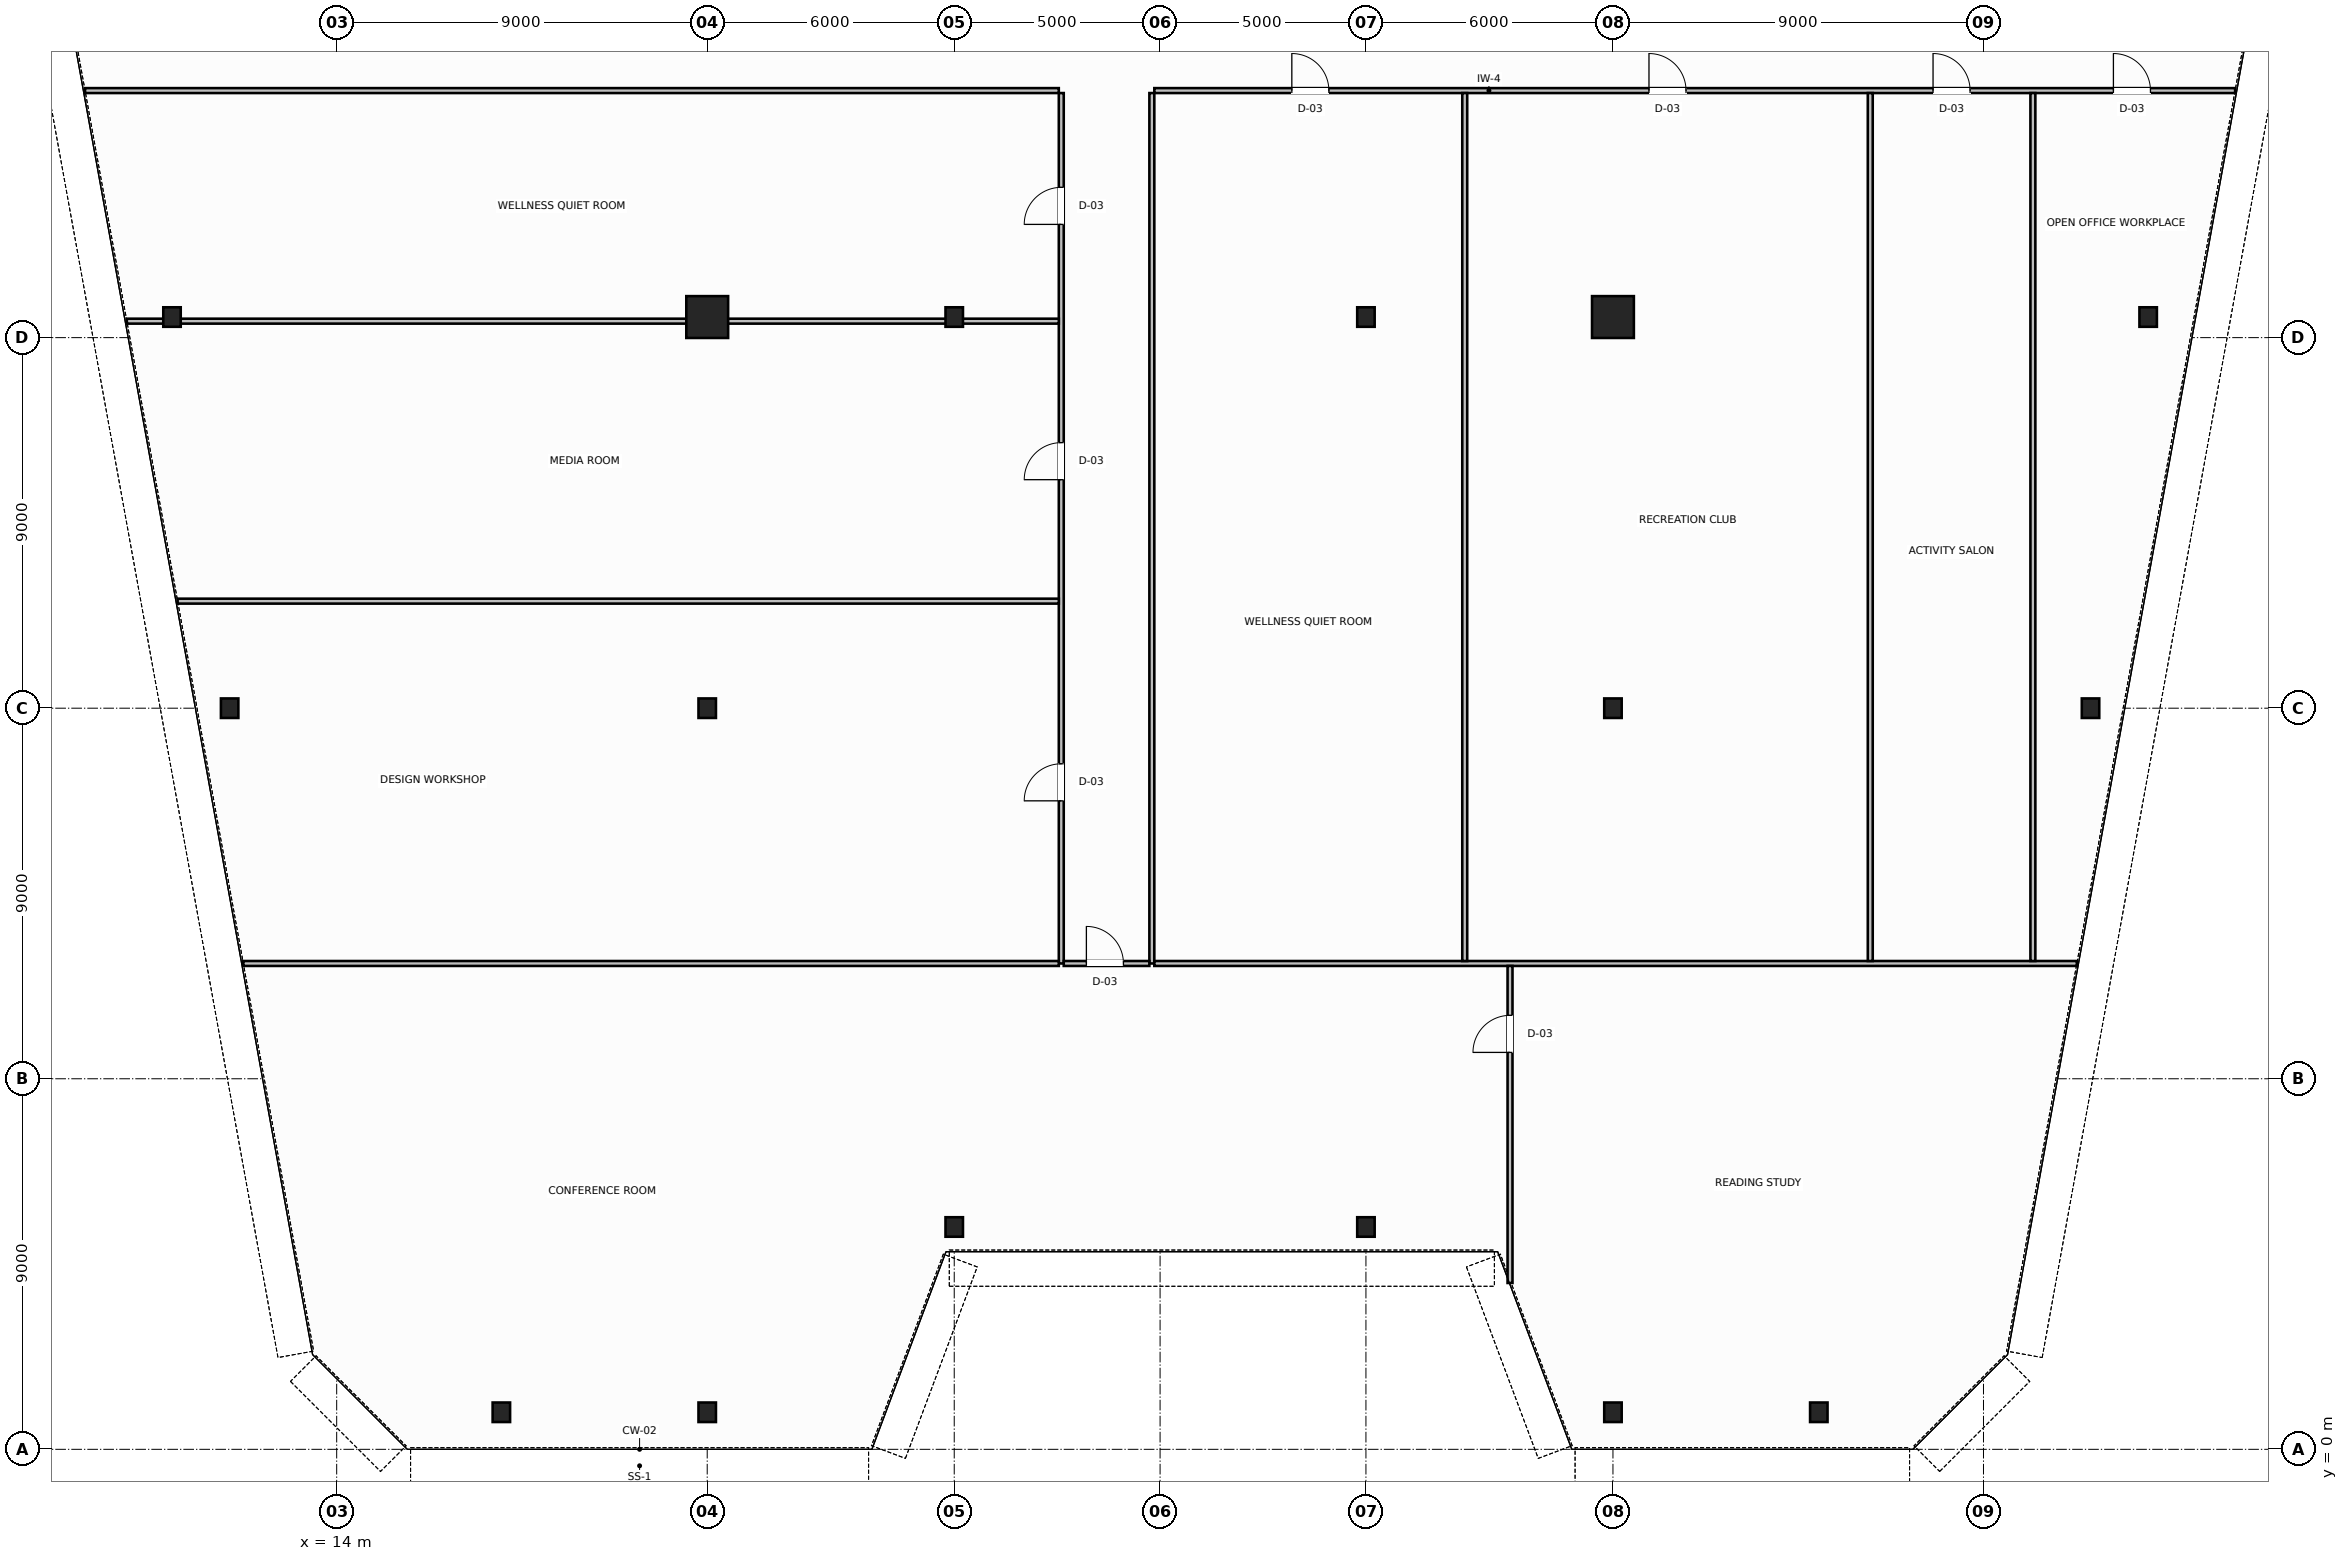
"""IFC4 building model, lengths in metres.
Left out: names, types, materials, properties, quantities, classifications, styles, units other than length and angle.
Written with IfcOpenShell. Run it as: python <this file> out.ifc"""

import sys

from ifc_helpers import new_model, si_unit, direction, frame, frame_2d, origin, origin_2d, place, context, subcontext, project, spatial, rectangle, hollow_circle, i_section, extrude, source, transform, mapped, element, fill, save


model = new_model("IFC4")
c1 = context("Model", 3, precision=1e-05, world=origin(), true_north=direction((0.0, 1.0)))
c2 = subcontext(c1, "Body", "Model", "MODEL_VIEW")
j1 = project(units=[si_unit("LENGTHUNIT", "METRE"), si_unit("PLANEANGLEUNIT", "RADIAN")], contexts=[c1])
p1 = place(None, origin())
s1 = spatial("IfcSite", under=j1, at=p1, CompositionType="ELEMENT")
p2 = place(p1, origin())
s2 = spatial("IfcBuilding", under=s1, at=p2, CompositionType="ELEMENT")
p3 = place(p2, frame((0.0, 0.0, 145.2)))
s3 = spatial("IfcBuildingStorey", under=s2, at=p3, CompositionType="ELEMENT", Elevation=145.2)
m1 = source(origin(), c2, "Body", "SweptSolid", [
    extrude(i_section(OverallWidth=0.424, OverallDepth=0.474, WebThickness=0.047, FlangeThickness=0.065, FilletRadius=0.015, at=origin_2d()), origin(), (0.0, 0.0, 1.0), 3.8),
])
for number, where, z_axis, x_axis in (
    (1, (10.0, 27.5, 0.0), (0.0, 0.0, 1.0), (1.0, 0.0, 0.0)),
    (2, (11.4, 18.0, 0.0), (0.0, 0.0, 1.0), (1.0, 0.0, 0.0)),
    (3, (58.0, 27.5, 0.0), (0.0, 0.0, 1.0), (1.0, 0.0, 0.0)),
    (4, (56.6, 18.0, 0.0), (0.0, 0.0, 1.0), (1.0, 0.0, 0.0)),
):
    element("IfcColumn", number, at=place(p3, frame(where, z_axis=z_axis, x_axis=x_axis)), inside=s3, PredefinedType="COLUMN", context=c2, shape_type="MappedRepresentation", body=[
        mapped(m1, transform((0.0, 0.0, 0.0), scale=1.0)),
    ])
m2 = source(origin(), c2, "Body", "SweptSolid", [
    extrude(hollow_circle(Radius=0.508, WallThickness=0.045, at=origin_2d()), origin(), (0.0, 0.0, 1.0), 3.8),
])
p4 = place(p3, frame((23.0, 27.5, 0.0), z_axis=(0.0, 0.0, 1.0), x_axis=(1.0, 0.0, 0.0)))
e5 = element("IfcColumn", 5, at=p4, inside=s3, PredefinedType="COLUMN", context=c2, shape_type="MappedRepresentation", body=[
    mapped(m2, transform((0.0, 0.0, 0.0), scale=1.0)),
])
m3 = source(origin(), c2, "Body", "SweptSolid", [
    extrude(i_section(OverallWidth=0.424, OverallDepth=0.474, WebThickness=0.047, FlangeThickness=0.065, FilletRadius=0.015, at=origin_2d()), origin(), (0.0, 0.0, 1.0), 3.8),
])
for number, where, z_axis, x_axis in (
    (6, (29.0, 27.5, 0.0), (0.0, 0.0, 1.0), (1.0, 0.0, 0.0)),
    (7, (39.0, 27.5, 0.0), (0.0, 0.0, 1.0), (1.0, 0.0, 0.0)),
):
    element("IfcColumn", number, at=place(p3, frame(where, z_axis=z_axis, x_axis=x_axis)), inside=s3, PredefinedType="COLUMN", context=c2, shape_type="MappedRepresentation", body=[
        mapped(m3, transform((0.0, 0.0, 0.0), scale=1.0)),
    ])
p5 = place(p3, frame((45.0, 27.5, 0.0), z_axis=(0.0, 0.0, 1.0), x_axis=(1.0, 0.0, 0.0)))
e8 = element("IfcColumn", 8, at=p5, inside=s3, PredefinedType="COLUMN", context=c2, shape_type="MappedRepresentation", body=[
    mapped(m2, transform((0.0, 0.0, 0.0), scale=1.0)),
])
for number, where, z_axis, x_axis in (
    (9, (23.0, 18.0, 0.0), (0.0, 0.0, 1.0), (1.0, 0.0, 0.0)),
    (10, (45.0, 18.0, 0.0), (0.0, 0.0, 1.0), (1.0, 0.0, 0.0)),
    (11, (18.0, 0.9, 0.0), (0.0, 0.0, 1.0), (1.0, 0.0, 0.0)),
    (12, (23.0, 0.9, 0.0), (0.0, 0.0, 1.0), (1.0, 0.0, 0.0)),
    (13, (29.0, 5.4, 0.0), (0.0, 0.0, 1.0), (1.0, 0.0, 0.0)),
    (14, (39.0, 5.4, 0.0), (0.0, 0.0, 1.0), (1.0, 0.0, 0.0)),
    (15, (45.0, 0.9, 0.0), (0.0, 0.0, 1.0), (1.0, 0.0, 0.0)),
    (16, (50.0, 0.9, 0.0), (0.0, 0.0, 1.0), (1.0, 0.0, 0.0)),
):
    element("IfcColumn", number, at=place(p3, frame(where, z_axis=z_axis, x_axis=x_axis)), inside=s3, PredefinedType="COLUMN", context=c2, shape_type="MappedRepresentation", body=[
        mapped(m3, transform((0.0, 0.0, 0.0), scale=1.0)),
    ])
p6 = place(p3, frame((7.887, 33.0, 0.0), z_axis=(0.0, 0.0, 1.0), x_axis=(1.0, 0.0, 0.0)))
e17 = element("IfcWall", 17, at=p6, inside=s3, PredefinedType="PARTITIONING", context=c2, shape_type="SweptSolid", body=[
    extrude(rectangle(XDim=23.653, YDim=0.12, at=frame_2d((11.826, 0.0))), origin(), (0.0, 0.0, 1.0), 3.08),
])
p7 = place(p3, frame((33.86, 33.0, 0.0), z_axis=(0.0, 0.0, 1.0), x_axis=(1.0, 0.0, 0.0)))
e18 = element("IfcWall", 18, at=p7, inside=s3, PredefinedType="PARTITIONING", context=c2, shape_type="SweptSolid", body=[
    extrude(rectangle(XDim=26.253, YDim=0.12, at=frame_2d((13.126, 0.0))), origin(), (0.0, 0.0, 1.0), 3.08),
])
p8 = place(p7, frame((3.34, 0.0, 0.0)))
e19 = element("IfcOpeningElement", 19, at=p8, cuts=e18, PredefinedType="OPENING", context=c2, shape_type="SweptSolid", body=[
    extrude(rectangle(XDim=0.9, YDim=2.15, at=frame_2d((0.45, 1.075))), frame((0.0, 0.07, 0.0), z_axis=(0.0, -1.0, 0.0), x_axis=(1.0, 0.0, 0.0)), (0.0, 0.0, 1.0), 0.14),
])
p9 = place(p7, frame((12.015, 0.0, 0.0)))
e20 = element("IfcOpeningElement", 20, at=p9, cuts=e18, PredefinedType="OPENING", context=c2, shape_type="SweptSolid", body=[
    extrude(rectangle(XDim=0.9, YDim=2.15, at=frame_2d((0.45, 1.075))), frame((0.0, 0.07, 0.0), z_axis=(0.0, -1.0, 0.0), x_axis=(1.0, 0.0, 0.0)), (0.0, 0.0, 1.0), 0.14),
])
p10 = place(p7, frame((18.915, 0.0, 0.0)))
e21 = element("IfcOpeningElement", 21, at=p10, cuts=e18, PredefinedType="OPENING", context=c2, shape_type="SweptSolid", body=[
    extrude(rectangle(XDim=0.9, YDim=2.15, at=frame_2d((0.45, 1.075))), frame((0.0, 0.07, 0.0), z_axis=(0.0, -1.0, 0.0), x_axis=(1.0, 0.0, 0.0)), (0.0, 0.0, 1.0), 0.14),
])
p11 = place(p7, frame((23.296, 0.0, 0.0)))
e22 = element("IfcOpeningElement", 22, at=p11, cuts=e18, PredefinedType="OPENING", context=c2, shape_type="SweptSolid", body=[
    extrude(rectangle(XDim=0.9, YDim=2.15, at=frame_2d((0.45, 1.075))), frame((0.0, 0.07, 0.0), z_axis=(0.0, -1.0, 0.0), x_axis=(1.0, 0.0, 0.0)), (0.0, 0.0, 1.0), 0.14),
])
p12 = place(p3, frame((31.6, 11.8, 0.0), z_axis=(0.0, 0.0, 1.0), x_axis=(0.0, 1.0, 0.0)))
e23 = element("IfcWall", 23, at=p12, inside=s3, PredefinedType="PARTITIONING", context=c2, shape_type="SweptSolid", body=[
    extrude(rectangle(XDim=21.14, YDim=0.12, at=frame_2d((10.57, 0.0))), origin(), (0.0, 0.0, 1.0), 3.54),
])
p13 = place(p12, frame((3.95, 0.0, 0.0)))
e24 = element("IfcOpeningElement", 24, at=p13, cuts=e23, PredefinedType="OPENING", context=c2, shape_type="SweptSolid", body=[
    extrude(rectangle(XDim=0.9, YDim=2.15, at=frame_2d((0.45, 1.075))), frame((0.0, 0.07, 0.0), z_axis=(0.0, -1.0, 0.0), x_axis=(1.0, 0.0, 0.0)), (0.0, 0.0, 1.0), 0.14),
])
p14 = place(p12, frame((11.75, 0.0, 0.0)))
e25 = element("IfcOpeningElement", 25, at=p14, cuts=e23, PredefinedType="OPENING", context=c2, shape_type="SweptSolid", body=[
    extrude(rectangle(XDim=0.9, YDim=2.15, at=frame_2d((0.45, 1.075))), frame((0.0, 0.07, 0.0), z_axis=(0.0, -1.0, 0.0), x_axis=(1.0, 0.0, 0.0)), (0.0, 0.0, 1.0), 0.14),
])
p15 = place(p12, frame((17.95, 0.0, 0.0)))
e26 = element("IfcOpeningElement", 26, at=p15, cuts=e23, PredefinedType="OPENING", context=c2, shape_type="SweptSolid", body=[
    extrude(rectangle(XDim=0.9, YDim=2.15, at=frame_2d((0.45, 1.075))), frame((0.0, 0.07, 0.0), z_axis=(0.0, -1.0, 0.0), x_axis=(1.0, 0.0, 0.0)), (0.0, 0.0, 1.0), 0.14),
])
p16 = place(p3, frame((33.8, 11.8, 0.0), z_axis=(0.0, 0.0, 1.0), x_axis=(0.0, 1.0, 0.0)))
e27 = element("IfcWall", 27, at=p16, inside=s3, PredefinedType="PARTITIONING", context=c2, shape_type="SweptSolid", body=[
    extrude(rectangle(XDim=21.14, YDim=0.12, at=frame_2d((10.57, 0.0))), origin(), (0.0, 0.0, 1.0), 3.54),
])
p17 = place(p3, frame((31.66, 11.8, 0.0), z_axis=(0.0, 0.0, 1.0), x_axis=(1.0, 0.0, 0.0)))
e28 = element("IfcWall", 28, at=p17, inside=s3, PredefinedType="PARTITIONING", context=c2, shape_type="SweptSolid", body=[
    extrude(rectangle(XDim=2.08, YDim=0.12, at=frame_2d((1.04, 0.0))), origin(), (0.0, 0.0, 1.0), 3.54),
])
p18 = place(p17, frame((0.55, 0.0, 0.0)))
e29 = element("IfcOpeningElement", 29, at=p18, cuts=e28, PredefinedType="OPENING", context=c2, shape_type="SweptSolid", body=[
    extrude(rectangle(XDim=0.9, YDim=2.15, at=frame_2d((0.45, 1.075))), frame((0.0, 0.07, 0.0), z_axis=(0.0, -1.0, 0.0), x_axis=(1.0, 0.0, 0.0)), (0.0, 0.0, 1.0), 0.14),
])
p19 = place(p3, frame((11.732, 11.8, 0.0), z_axis=(0.0, 0.0, 1.0), x_axis=(1.0, 0.0, 0.0)))
e30 = element("IfcWall", 30, at=p19, inside=s3, PredefinedType="PARTITIONING", context=c2, shape_type="SweptSolid", body=[
    extrude(rectangle(XDim=19.808, YDim=0.12, at=frame_2d((9.904, 0.0))), origin(), (0.0, 0.0, 1.0), 3.54),
])
p20 = place(p3, frame((33.86, 11.8, 0.0), z_axis=(0.0, 0.0, 1.0), x_axis=(1.0, 0.0, 0.0)))
e31 = element("IfcWall", 31, at=p20, inside=s3, PredefinedType="PARTITIONING", context=c2, shape_type="SweptSolid", body=[
    extrude(rectangle(XDim=22.408, YDim=0.12, at=frame_2d((11.204, 0.0))), origin(), (0.0, 0.0, 1.0), 3.54),
])
p21 = place(p3, frame((42.5, 4.04, 0.0), z_axis=(0.0, 0.0, 1.0), x_axis=(0.0, 1.0, 0.0)))
e32 = element("IfcWall", 32, at=p21, inside=s3, PredefinedType="PARTITIONING", context=c2, shape_type="SweptSolid", body=[
    extrude(rectangle(XDim=7.7, YDim=0.12, at=frame_2d((3.85, 0.0))), origin(), (0.0, 0.0, 1.0), 3.54),
])
p22 = place(p21, frame((5.6, 0.0, 0.0)))
e33 = element("IfcOpeningElement", 33, at=p22, cuts=e32, PredefinedType="OPENING", context=c2, shape_type="SweptSolid", body=[
    extrude(rectangle(XDim=0.9, YDim=2.15, at=frame_2d((0.45, 1.075))), frame((0.0, 0.07, 0.0), z_axis=(0.0, -1.0, 0.0), x_axis=(1.0, 0.0, 0.0)), (0.0, 0.0, 1.0), 0.14),
])
p23 = place(p3, frame((10.136, 20.6, 0.0), z_axis=(0.0, 0.0, 1.0), x_axis=(1.0, 0.0, 0.0)))
e34 = element("IfcWall", 34, at=p23, inside=s3, PredefinedType="PARTITIONING", context=c2, shape_type="SweptSolid", body=[
    extrude(rectangle(XDim=21.404, YDim=0.12, at=frame_2d((10.702, 0.0))), origin(), (0.0, 0.0, 1.0), 3.54),
])
p24 = place(p3, frame((8.903, 27.4, 0.0), z_axis=(0.0, 0.0, 1.0), x_axis=(1.0, 0.0, 0.0)))
e35 = element("IfcWall", 35, at=p24, inside=s3, PredefinedType="PARTITIONING", context=c2, shape_type="SweptSolid", body=[
    extrude(rectangle(XDim=22.637, YDim=0.12, at=frame_2d((11.319, 0.0))), origin(), (0.0, 0.0, 1.0), 2.83),
])
for number, where, z_axis, x_axis in (
    (36, (41.4, 11.86, 0.0), (0.0, 0.0, 1.0), (0.0, 1.0, 0.0)),
    (37, (51.25, 11.86, 0.0), (0.0, 0.0, 1.0), (0.0, 1.0, 0.0)),
):
    element("IfcWall", number, at=place(p3, frame(where, z_axis=z_axis, x_axis=x_axis)), inside=s3, PredefinedType="PARTITIONING", context=c2, shape_type="SweptSolid", body=[
        extrude(rectangle(XDim=21.08, YDim=0.12, at=frame_2d((10.54, 0.0))), origin(), (0.0, 0.0, 1.0), 3.54),
    ])
p25 = place(p3, frame((55.2, 11.86, 0.0), z_axis=(0.0, 0.0, 1.0), x_axis=(0.0, 1.0, 0.0)))
e38 = element("IfcWall", 38, at=p25, inside=s3, PredefinedType="PARTITIONING", context=c2, shape_type="SweptSolid", body=[
    extrude(rectangle(XDim=21.08, YDim=0.12, at=frame_2d((10.54, 0.0))), origin(), (0.0, 0.0, 1.0), 2.83),
])
m4 = source(origin(), c2, "Body", "SweptSolid", [
    extrude(rectangle(XDim=0.9, YDim=2.15, at=frame_2d((0.45, 1.075))), frame((0.0, 0.025, 0.0), z_axis=(0.0, -1.0, 0.0), x_axis=(1.0, 0.0, 0.0)), (0.0, 0.0, 1.0), 0.05),
])
p26 = place(p18, origin())
e39 = element("IfcDoor", 39, at=p26, inside=s3, OperationType="SINGLE_SWING_LEFT", PredefinedType="DOOR", context=c2, shape_type="MappedRepresentation", body=[
    mapped(m4, transform((0.0, 0.0, 0.0), scale=1.0)),
])
fill(e29, e39)
p27 = place(p22, origin())
e40 = element("IfcDoor", 40, at=p27, inside=s3, OperationType="SINGLE_SWING_RIGHT", PredefinedType="DOOR", context=c2, shape_type="MappedRepresentation", body=[
    mapped(m4, transform((0.0, 0.0, 0.0), scale=1.0)),
])
fill(e33, e40)
p28 = place(p13, origin())
e41 = element("IfcDoor", 41, at=p28, inside=s3, OperationType="SINGLE_SWING_LEFT", PredefinedType="DOOR", context=c2, shape_type="MappedRepresentation", body=[
    mapped(m4, transform((0.0, 0.0, 0.0), scale=1.0)),
])
fill(e24, e41)
p29 = place(p14, origin())
e42 = element("IfcDoor", 42, at=p29, inside=s3, OperationType="SINGLE_SWING_RIGHT", PredefinedType="DOOR", context=c2, shape_type="MappedRepresentation", body=[
    mapped(m4, transform((0.0, 0.0, 0.0), scale=1.0)),
])
fill(e25, e42)
p30 = place(p15, origin())
e43 = element("IfcDoor", 43, at=p30, inside=s3, OperationType="SINGLE_SWING_LEFT", PredefinedType="DOOR", context=c2, shape_type="MappedRepresentation", body=[
    mapped(m4, transform((0.0, 0.0, 0.0), scale=1.0)),
])
fill(e26, e43)
p31 = place(p8, origin())
e44 = element("IfcDoor", 44, at=p31, inside=s3, OperationType="SINGLE_SWING_RIGHT", PredefinedType="DOOR", context=c2, shape_type="MappedRepresentation", body=[
    mapped(m4, transform((0.0, 0.0, 0.0), scale=1.0)),
])
fill(e19, e44)
p32 = place(p9, origin())
e45 = element("IfcDoor", 45, at=p32, inside=s3, OperationType="SINGLE_SWING_LEFT", PredefinedType="DOOR", context=c2, shape_type="MappedRepresentation", body=[
    mapped(m4, transform((0.0, 0.0, 0.0), scale=1.0)),
])
fill(e20, e45)
p33 = place(p10, origin())
e46 = element("IfcDoor", 46, at=p33, inside=s3, OperationType="SINGLE_SWING_RIGHT", PredefinedType="DOOR", context=c2, shape_type="MappedRepresentation", body=[
    mapped(m4, transform((0.0, 0.0, 0.0), scale=1.0)),
])
fill(e21, e46)
p34 = place(p11, origin())
e47 = element("IfcDoor", 47, at=p34, inside=s3, OperationType="SINGLE_SWING_LEFT", PredefinedType="DOOR", context=c2, shape_type="MappedRepresentation", body=[
    mapped(m4, transform((0.0, 0.0, 0.0), scale=1.0)),
])
fill(e22, e47)
save(model, sys.argv[1])
